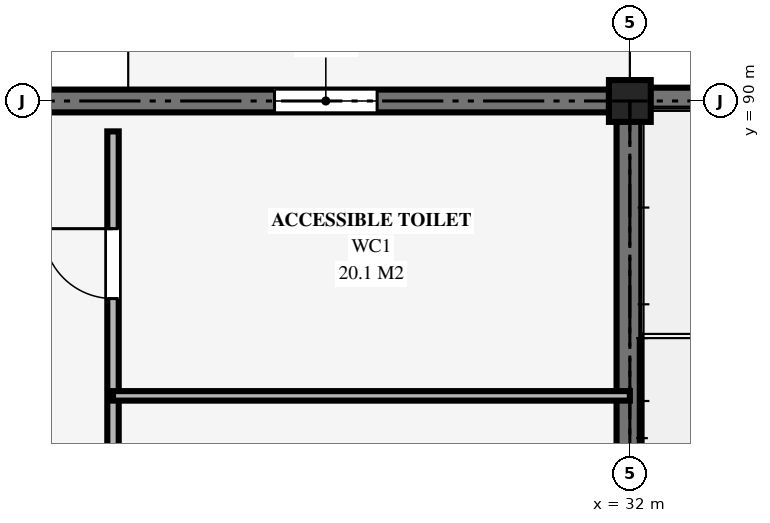
"""IFC4 building model, lengths in metres.
Left out: names, types, materials, properties, quantities, classifications, styles, units other than length and angle.
Written with IfcOpenShell. Run it as: python <this file> out.ifc"""

import sys

from ifc_helpers import new_model, si_unit, direction, frame, frame_2d, origin, origin_2d, place, context, subcontext, project, spatial, rectangle, extrude, element, fill, save


model = new_model("IFC4")
c1 = context("Model", 3, precision=1e-05, world=origin(), true_north=direction((0.0, 1.0)))
c2 = subcontext(c1, "Body", "Model", "MODEL_VIEW")
j1 = project(units=[si_unit("LENGTHUNIT", "METRE"), si_unit("PLANEANGLEUNIT", "RADIAN")], contexts=[c1])
p1 = place(None, origin())
s1 = spatial("IfcSite", under=j1, at=p1, CompositionType="ELEMENT")
p2 = place(p1, origin())
s2 = spatial("IfcBuilding", under=s1, at=p2, CompositionType="ELEMENT")
p3 = place(p2, frame((0.0, 0.0, 5.4)))
s3 = spatial("IfcBuildingStorey", under=s2, at=p3, CompositionType="ELEMENT", Elevation=5.4)
p4 = place(p3, frame((32.0, 90.0, 0.0), z_axis=(0.0, 0.0, 1.0), x_axis=(1.0, 0.0, 0.0)))
e1 = element("IfcColumn", 1, at=p4, inside=s3, PredefinedType="COLUMN", context=c2, shape_type="SweptSolid", body=[
    extrude(rectangle(XDim=0.55, YDim=0.55, at=origin_2d()), origin(), (0.0, 0.0, 1.0), 4.64),
])
p5 = place(p3, frame((24.275, 90.0, 0.0), z_axis=(0.0, 0.0, 1.0), x_axis=(1.0, 0.0, 0.0)))
e2 = element("IfcWall", 2, at=p5, inside=s3, PredefinedType="SOLIDWALL", context=c2, shape_type="SweptSolid", body=[
    extrude(rectangle(XDim=7.45, YDim=0.3, at=frame_2d((3.725, 0.0))), origin(), (0.0, 0.0, 1.0), 4.52),
])
p6 = place(p5, frame((3.05, 0.0, 1.0)))
e3 = element("IfcOpeningElement", 3, at=p6, cuts=e2, PredefinedType="OPENING", context=c2, shape_type="SweptSolid", body=[
    extrude(rectangle(XDim=1.35, YDim=1.65, at=frame_2d((0.675, 0.825))), frame((0.0, 0.16, 0.0), z_axis=(0.0, -1.0, 0.0), x_axis=(1.0, 0.0, 0.0)), (0.0, 0.0, 1.0), 0.32),
])
p7 = place(p3, frame((32.0, 90.0, 0.0), z_axis=(0.0, 0.0, 1.0), x_axis=(1.0, 0.0, 0.0)))
e4 = element("IfcWall", 4, at=p7, inside=s3, PredefinedType="SHEAR", context=c2, shape_type="SweptSolid", body=[
    extrude(rectangle(XDim=8.0, YDim=0.35, at=frame_2d((4.0, 0.0))), origin(), (0.0, 0.0, 1.0), 4.78),
])
p8 = place(p3, frame((32.0, 78.0, 0.0), z_axis=(0.0, 0.0, 1.0), x_axis=(0.0, 1.0, 0.0)))
e5 = element("IfcWall", 5, at=p8, inside=s3, PredefinedType="SHEAR", context=c2, shape_type="SweptSolid", body=[
    extrude(rectangle(XDim=12.0, YDim=0.35, at=frame_2d((6.0, 0.0))), origin(), (0.0, 0.0, 1.0), 4.78),
])
p9 = place(p3, frame((25.2, 78.0, 0.0), z_axis=(0.0, 0.0, 1.0), x_axis=(0.0, 1.0, 0.0)))
e6 = element("IfcWall", 6, at=p9, inside=s3, PredefinedType="PARTITIONING", context=c2, shape_type="SweptSolid", body=[
    extrude(rectangle(XDim=11.6, YDim=0.15, at=frame_2d((5.8, 0.0))), origin(), (0.0, 0.0, 1.0), 3.65),
])
p10 = place(p9, frame((1.754, 0.0, 0.0)))
e7 = element("IfcOpeningElement", 7, at=p10, cuts=e6, PredefinedType="OPENING", context=c2, shape_type="SweptSolid", body=[
    extrude(rectangle(XDim=0.9, YDim=2.1, at=frame_2d((0.45, 1.05))), frame((0.0, 0.085, 0.0), z_axis=(0.0, -1.0, 0.0), x_axis=(1.0, 0.0, 0.0)), (0.0, 0.0, 1.0), 0.17),
])
p11 = place(p9, frame((5.814, 0.0, 0.0)))
e8 = element("IfcOpeningElement", 8, at=p11, cuts=e6, PredefinedType="OPENING", context=c2, shape_type="SweptSolid", body=[
    extrude(rectangle(XDim=0.9, YDim=2.1, at=frame_2d((0.45, 1.05))), frame((0.0, 0.085, 0.0), z_axis=(0.0, -1.0, 0.0), x_axis=(1.0, 0.0, 0.0)), (0.0, 0.0, 1.0), 0.17),
])
p12 = place(p9, frame((9.4, 0.0, 0.0)))
e9 = element("IfcOpeningElement", 9, at=p12, cuts=e6, PredefinedType="OPENING", context=c2, shape_type="SweptSolid", body=[
    extrude(rectangle(XDim=0.92, YDim=2.1, at=frame_2d((0.46, 1.05))), frame((0.0, 0.085, 0.0), z_axis=(0.0, -1.0, 0.0), x_axis=(1.0, 0.0, 0.0)), (0.0, 0.0, 1.0), 0.17),
])
p13 = place(p3, frame((25.2, 86.12, 0.0), z_axis=(0.0, 0.0, 1.0), x_axis=(1.0, 0.0, 0.0)))
e10 = element("IfcWall", 10, at=p13, inside=s3, PredefinedType="PARTITIONING", context=c2, shape_type="SweptSolid", body=[
    extrude(rectangle(XDim=6.8, YDim=0.125, at=frame_2d((3.4, 0.0))), origin(), (0.0, 0.0, 1.0), 3.65),
])
p14 = place(p6, origin())
e11 = element("IfcWindow", 11, at=p14, inside=s3, PartitioningType="SINGLE_PANEL", PredefinedType="WINDOW", context=c2, shape_type="SweptSolid", body=[
    extrude(rectangle(XDim=1.35, YDim=1.65, at=frame_2d((0.675, 0.825))), frame((0.0, 0.03, 0.0), z_axis=(0.0, -1.0, 0.0), x_axis=(1.0, 0.0, 0.0)), (0.0, 0.0, 1.0), 0.06),
])
fill(e3, e11)
p15 = place(p12, origin())
e12 = element("IfcDoor", 12, at=p15, inside=s3, OperationType="SINGLE_SWING_RIGHT", PredefinedType="DOOR", context=c2, shape_type="SweptSolid", body=[
    extrude(rectangle(XDim=0.92, YDim=2.1, at=frame_2d((0.46, 1.05))), frame((0.0, 0.025, 0.0), z_axis=(0.0, -1.0, 0.0), x_axis=(1.0, 0.0, 0.0)), (0.0, 0.0, 1.0), 0.05),
])
fill(e9, e12)
save(model, sys.argv[1])
